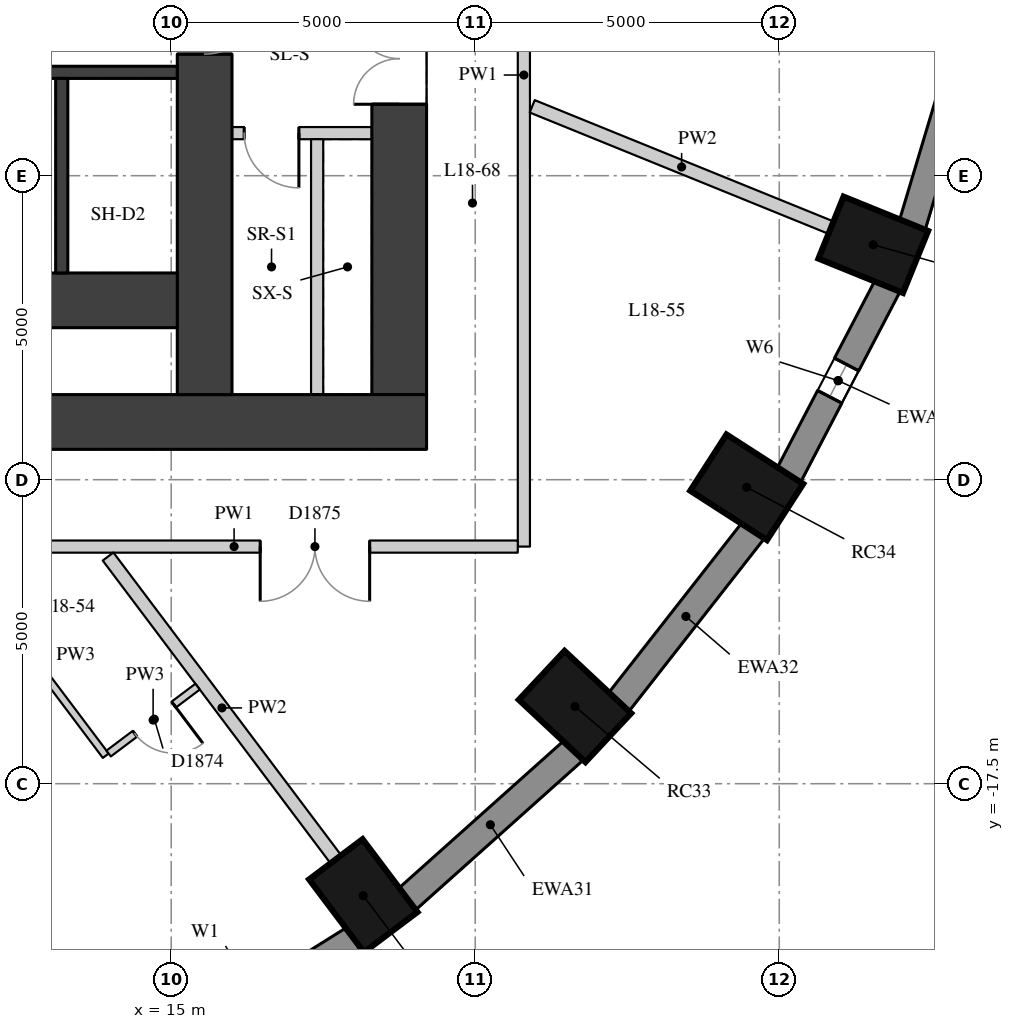
"""IFC4 building model, lengths in metres.
Left out: names, types, materials, properties, quantities, classifications, styles, units other than length and angle.
Written with IfcOpenShell. Run it as: python <this file> out.ifc"""

import sys

from ifc_helpers import new_model, si_unit, direction, frame, frame_2d, origin, origin_2d, place, context, subcontext, project, spatial, rectangle, extrude, element, fill, save


model = new_model("IFC4")
c1 = context("Model", 3, precision=1e-05, world=origin(), true_north=direction((0.0, 1.0)))
c2 = subcontext(c1, "Body", "Model", "MODEL_VIEW")
j1 = project(units=[si_unit("LENGTHUNIT", "METRE"), si_unit("PLANEANGLEUNIT", "RADIAN")], contexts=[c1])
p1 = place(None, origin())
s1 = spatial("IfcSite", under=j1, at=p1, CompositionType="ELEMENT")
p2 = place(p1, origin())
s2 = spatial("IfcBuilding", under=s1, at=p2, CompositionType="ELEMENT")
p3 = place(p2, frame((0.0, 0.0, 67.9)))
s3 = spatial("IfcBuildingStorey", under=s2, at=p3, CompositionType="ELEMENT", Elevation=67.9)
for number, where, z_axis, x_axis in (
    (1, (18.159, -19.343, 0.0), (0.0, 0.0, 1.0), (0.601, -0.799, 0.0)),
    (2, (21.641, -16.23, 0.0), (0.0, 0.0, 1.0), (0.73, -0.683, 0.0)),
    (3, (24.465, -12.625, 0.0), (0.0, 0.0, 1.0), (0.841, -0.541, 0.0)),
    (4, (26.546, -8.636, 0.0), (0.0, 0.0, 1.0), (0.927, -0.376, 0.0)),
):
    element("IfcColumn", number, at=place(p3, frame(where, z_axis=z_axis, x_axis=x_axis)), inside=s3, PredefinedType="COLUMN", context=c2, shape_type="SweptSolid", body=[
        extrude(rectangle(XDim=1.5, YDim=1.1, at=origin_2d()), origin(), (0.0, 0.0, 1.0), 3.3),
    ])
p4 = place(p3, frame((14.817, -22.051, 0.0), z_axis=(0.0, 0.0, 1.0), x_axis=(0.847635480093, 0.530579016629, 0.0)))
e5 = element("IfcWall", 5, at=p4, inside=s3, PredefinedType="SOLIDWALL", context=c2, shape_type="SweptSolid", body=[
    extrude(rectangle(XDim=3.782, YDim=0.45, at=frame_2d((1.891, 0.0))), origin(), (0.0, 0.0, 1.0), 3.02),
])
p5 = place(p4, frame((0.791, 0.0, 0.4)))
e6 = element("IfcOpeningElement", 6, at=p5, cuts=e5, PredefinedType="OPENING", context=c2, shape_type="SweptSolid", body=[
    extrude(rectangle(XDim=2.2, YDim=1.75, at=frame_2d((1.1, 0.875))), frame((0.0, 0.235, 0.0), z_axis=(0.0, -1.0, 0.0), x_axis=(1.0, 0.0, 0.0)), (0.0, 0.0, 1.0), 0.47),
])
p6 = place(p3, frame((18.871, -19.407, 0.0), z_axis=(0.0, 0.0, 1.0), x_axis=(0.745526233716, 0.66647628228, 0.0)))
e7 = element("IfcWall", 7, at=p6, inside=s3, PredefinedType="SOLIDWALL", context=c2, shape_type="SweptSolid", body=[
    extrude(rectangle(XDim=3.697, YDim=0.45, at=frame_2d((1.848, 0.0))), origin(), (0.0, 0.0, 1.0), 3.02),
])
p7 = place(p3, frame((22.352, -16.17, 0.0), z_axis=(0.0, 0.0, 1.0), x_axis=(0.616661975264, 0.787228053529, 0.0)))
e8 = element("IfcWall", 8, at=p7, inside=s3, PredefinedType="SOLIDWALL", context=c2, shape_type="SweptSolid", body=[
    extrude(rectangle(XDim=3.61, YDim=0.45, at=frame_2d((1.805, 0.0))), origin(), (0.0, 0.0, 1.0), 3.02),
])
p8 = place(p3, frame((25.152, -12.437, 0.0), z_axis=(0.0, 0.0, 1.0), x_axis=(0.462492775226, 0.886623050041, 0.0)))
e9 = element("IfcWall", 9, at=p8, inside=s3, PredefinedType="SOLIDWALL", context=c2, shape_type="SweptSolid", body=[
    extrude(rectangle(XDim=3.532, YDim=0.45, at=frame_2d((1.766, 0.0))), origin(), (0.0, 0.0, 1.0), 3.02),
])
p9 = place(p8, frame((1.466, 0.0, 0.4)))
e10 = element("IfcOpeningElement", 10, at=p9, cuts=e9, PredefinedType="OPENING", context=c2, shape_type="SweptSolid", body=[
    extrude(rectangle(XDim=0.6, YDim=1.75, at=frame_2d((0.3, 0.875))), frame((0.0, 0.235, 0.0), z_axis=(0.0, -1.0, 0.0), x_axis=(1.0, 0.0, 0.0)), (0.0, 0.0, 1.0), 0.47),
])
p10 = place(p3, frame((27.185, -8.323, 0.0), z_axis=(0.0, 0.0, 1.0), x_axis=(0.287064133733, 0.957911364963, 0.0)))
e11 = element("IfcWall", 11, at=p10, inside=s3, PredefinedType="SOLIDWALL", context=c2, shape_type="SweptSolid", body=[
    extrude(rectangle(XDim=3.473, YDim=0.45, at=frame_2d((1.737, 0.0))), origin(), (0.0, 0.0, 1.0), 3.02),
])
p11 = place(p3, frame((18.75, -11.1, 0.0), z_axis=(0.0, 0.0, 1.0), x_axis=(0.0, 1.0, 0.0)))
e12 = element("IfcWall", 12, at=p11, inside=s3, PredefinedType="SHEAR", context=c2, shape_type="SweptSolid", body=[
    extrude(rectangle(XDim=22.2, YDim=0.9, at=frame_2d((11.1, 0.0))), origin(), (0.0, 0.0, 1.0), 3.02),
])
p12 = place(p11, frame((15.675, 0.0, 0.0)))
e13 = element("IfcOpeningElement", 13, at=p12, cuts=e12, PredefinedType="OPENING", context=c2, shape_type="SweptSolid", body=[
    extrude(rectangle(XDim=1.5, YDim=2.1, at=frame_2d((0.75, 1.05))), frame((0.0, 0.46, 0.0), z_axis=(0.0, -1.0, 0.0), x_axis=(1.0, 0.0, 0.0)), (0.0, 0.0, 1.0), 0.92),
])
p13 = place(p11, frame((4.775, 0.0, 0.0)))
e14 = element("IfcOpeningElement", 14, at=p13, cuts=e12, PredefinedType="OPENING", context=c2, shape_type="SweptSolid", body=[
    extrude(rectangle(XDim=1.5, YDim=2.1, at=frame_2d((0.75, 1.05))), frame((0.0, 0.46, 0.0), z_axis=(0.0, -1.0, 0.0), x_axis=(1.0, 0.0, 0.0)), (0.0, 0.0, 1.0), 0.92),
])
p14 = place(p3, frame((4.0, -11.55, 0.0), z_axis=(0.0, 0.0, 1.0), x_axis=(1.0, 0.0, 0.0)))
e15 = element("IfcWall", 15, at=p14, inside=s3, PredefinedType="SHEAR", context=c2, shape_type="SweptSolid", body=[
    extrude(rectangle(XDim=15.2, YDim=0.9, at=frame_2d((7.6, 0.0))), origin(), (0.0, 0.0, 1.0), 3.02),
])
p15 = place(p3, frame((15.55, -11.1, 0.0), z_axis=(0.0, 0.0, 1.0), x_axis=(0.0, 1.0, 0.0)))
e16 = element("IfcWall", 16, at=p15, inside=s3, PredefinedType="SHEAR", context=c2, shape_type="SweptSolid", body=[
    extrude(rectangle(XDim=22.2, YDim=0.9, at=frame_2d((11.1, 0.0))), origin(), (0.0, 0.0, 1.0), 3.02),
])
p16 = place(p15, frame((15.6, 0.0, 0.0)))
e17 = element("IfcOpeningElement", 17, at=p16, cuts=e16, PredefinedType="OPENING", context=c2, shape_type="SweptSolid", body=[
    extrude(rectangle(XDim=1.0, YDim=2.1, at=frame_2d((0.5, 1.05))), frame((0.0, 0.46, 0.0), z_axis=(0.0, -1.0, 0.0), x_axis=(1.0, 0.0, 0.0)), (0.0, 0.0, 1.0), 0.92),
])
p17 = place(p15, frame((5.6, 0.0, 0.0)))
e18 = element("IfcOpeningElement", 18, at=p17, cuts=e16, PredefinedType="OPENING", context=c2, shape_type="SweptSolid", body=[
    extrude(rectangle(XDim=1.0, YDim=2.1, at=frame_2d((0.5, 1.05))), frame((0.0, 0.46, 0.0), z_axis=(0.0, -1.0, 0.0), x_axis=(1.0, 0.0, 0.0)), (0.0, 0.0, 1.0), 0.92),
])
p18 = place(p3, frame((4.9, -9.55, 0.0), z_axis=(0.0, 0.0, 1.0), x_axis=(1.0, 0.0, 0.0)))
e19 = element("IfcWall", 19, at=p18, inside=s3, PredefinedType="SHEAR", context=c2, shape_type="SweptSolid", body=[
    extrude(rectangle(XDim=10.2, YDim=0.9, at=frame_2d((5.1, 0.0))), origin(), (0.0, 0.0, 1.0), 3.02),
])
p19 = place(p3, frame((4.9, -5.8, 0.0), z_axis=(0.0, 0.0, 1.0), x_axis=(1.0, 0.0, 0.0)))
e20 = element("IfcWall", 20, at=p19, inside=s3, PredefinedType="SHEAR", context=c2, shape_type="SweptSolid", body=[
    extrude(rectangle(XDim=10.2, YDim=0.2, at=frame_2d((5.1, 0.0))), origin(), (0.0, 0.0, 1.0), 3.02),
])
p20 = place(p3, frame((13.2, -9.1, 0.0), z_axis=(0.0, 0.0, 1.0), x_axis=(0.0, 1.0, 0.0)))
e21 = element("IfcWall", 21, at=p20, inside=s3, PredefinedType="SHEAR", context=c2, shape_type="SweptSolid", body=[
    extrude(rectangle(XDim=3.2, YDim=0.2, at=frame_2d((1.6, 0.0))), origin(), (0.0, 0.0, 1.0), 3.02),
])
p21 = place(p3, frame((16.0, -6.8, 0.0), z_axis=(0.0, 0.0, 1.0), x_axis=(1.0, 0.0, 0.0)))
e22 = element("IfcWall", 22, at=p21, inside=s3, PredefinedType="PARTITIONING", context=c2, shape_type="SweptSolid", body=[
    extrude(rectangle(XDim=2.3, YDim=0.2, at=frame_2d((1.15, 0.0))), origin(), (0.0, 0.0, 1.0), 3.02),
])
p22 = place(p21, frame((0.2, 0.0, 0.0)))
e23 = element("IfcOpeningElement", 23, at=p22, cuts=e22, PredefinedType="OPENING", context=c2, shape_type="SweptSolid", body=[
    extrude(rectangle(XDim=0.9, YDim=2.1, at=frame_2d((0.45, 1.05))), frame((0.0, 0.11, 0.0), z_axis=(0.0, -1.0, 0.0), x_axis=(1.0, 0.0, 0.0)), (0.0, 0.0, 1.0), 0.22),
])
p23 = place(p3, frame((17.4, -11.1, 0.0), z_axis=(0.0, 0.0, 1.0), x_axis=(0.0, 1.0, 0.0)))
e24 = element("IfcWall", 24, at=p23, inside=s3, PredefinedType="PARTITIONING", context=c2, shape_type="SweptSolid", body=[
    extrude(rectangle(XDim=4.2, YDim=0.2, at=frame_2d((2.1, 0.0))), origin(), (0.0, 0.0, 1.0), 3.02),
])
p24 = place(p3, frame((20.8, 1.912, 0.0), z_axis=(0.0, 0.0, 1.0), x_axis=(0.0, -1.0, 0.0)))
e25 = element("IfcWall", 25, at=p24, inside=s3, PredefinedType="PARTITIONING", context=c2, shape_type="SweptSolid", body=[
    extrude(rectangle(XDim=15.512, YDim=0.2, at=frame_2d((7.756, 0.0))), origin(), (0.0, 0.0, 1.0), 3.02),
])
p25 = place(p24, frame((3.11, 0.0, 0.0)))
e26 = element("IfcOpeningElement", 26, at=p25, cuts=e25, PredefinedType="OPENING", context=c2, shape_type="SweptSolid", body=[
    extrude(rectangle(XDim=1.8, YDim=2.1, at=frame_2d((0.9, 1.05))), frame((0.0, 0.11, 0.0), z_axis=(0.0, -1.0, 0.0), x_axis=(1.0, 0.0, 0.0)), (0.0, 0.0, 1.0), 0.22),
])
p26 = place(p3, frame((20.7, -13.6, 0.0), z_axis=(0.0, 0.0, 1.0), x_axis=(-1.0, 0.0, 0.0)))
e27 = element("IfcWall", 27, at=p26, inside=s3, PredefinedType="PARTITIONING", context=c2, shape_type="SweptSolid", body=[
    extrude(rectangle(XDim=9.331, YDim=0.2, at=frame_2d((4.666, 0.0))), origin(), (0.0, 0.0, 1.0), 3.02),
])
p27 = place(p26, frame((2.436, 0.0, 0.0)))
e28 = element("IfcOpeningElement", 28, at=p27, cuts=e27, PredefinedType="OPENING", context=c2, shape_type="SweptSolid", body=[
    extrude(rectangle(XDim=1.8, YDim=2.1, at=frame_2d((0.9, 1.05))), frame((0.0, 0.11, 0.0), z_axis=(0.0, -1.0, 0.0), x_axis=(1.0, 0.0, 0.0)), (0.0, 0.0, 1.0), 0.22),
])
p28 = place(p3, frame((17.708, -18.743, 0.0), z_axis=(0.0, 0.0, 1.0), x_axis=(-0.601177883261, 0.799115231164, 0.0)))
e29 = element("IfcWall", 29, at=p28, inside=s3, PredefinedType="PARTITIONING", context=c2, shape_type="SweptSolid", body=[
    extrude(rectangle(XDim=6.231, YDim=0.22, at=frame_2d((3.116, 0.0))), origin(), (0.0, 0.0, 1.0), 3.02),
])
p29 = place(p3, frame((25.851, -8.354, 0.0), z_axis=(0.0, 0.0, 1.0), x_axis=(-0.926546814299, 0.376179479653, 0.0)))
e30 = element("IfcWall", 30, at=p29, inside=s3, PredefinedType="PARTITIONING", context=c2, shape_type="SweptSolid", body=[
    extrude(rectangle(XDim=5.304, YDim=0.22, at=frame_2d((2.652, 0.0))), origin(), (0.0, 0.0, 1.0), 3.02),
])
p30 = place(p3, frame((11.435, -13.732, 0.0), z_axis=(0.0, 0.0, 1.0), x_axis=(0.601141274104, -0.799142771079, 0.0)))
e31 = element("IfcWall", 31, at=p30, inside=s3, PredefinedType="PARTITIONING", context=c2, shape_type="SweptSolid", body=[
    extrude(rectangle(XDim=4.139, YDim=0.12, at=frame_2d((2.07, 0.0))), origin(), (0.0, 0.0, 1.0), 3.02),
])
p31 = place(p3, frame((13.971, -17.004, 0.0), z_axis=(0.0, 0.0, 1.0), x_axis=(0.799231057954, 0.60102388971, 0.0)))
e32 = element("IfcWall", 32, at=p31, inside=s3, PredefinedType="PARTITIONING", context=c2, shape_type="SweptSolid", body=[
    extrude(rectangle(XDim=1.83, YDim=0.12, at=frame_2d((0.915, 0.0))), origin(), (0.0, 0.0, 1.0), 3.02),
])
p32 = place(p31, frame((0.54, 0.0, 0.0)))
e33 = element("IfcOpeningElement", 33, at=p32, cuts=e32, PredefinedType="OPENING", context=c2, shape_type="SweptSolid", body=[
    extrude(rectangle(XDim=0.8, YDim=2.1, at=frame_2d((0.4, 1.05))), frame((0.0, 0.07, 0.0), z_axis=(0.0, -1.0, 0.0), x_axis=(1.0, 0.0, 0.0)), (0.0, 0.0, 1.0), 0.14),
])
p33 = place(p9, origin())
e34 = element("IfcWindow", 34, at=p33, inside=s3, PartitioningType="SINGLE_PANEL", PredefinedType="WINDOW", context=c2, shape_type="SweptSolid", body=[
    extrude(rectangle(XDim=0.6, YDim=1.75, at=frame_2d((0.3, 0.875))), frame((0.0, 0.035, 0.0), z_axis=(0.0, -1.0, 0.0), x_axis=(1.0, 0.0, 0.0)), (0.0, 0.0, 1.0), 0.06),
])
fill(e10, e34)
p34 = place(p13, origin())
e35 = element("IfcDoor", 35, at=p34, inside=s3, OperationType="DOUBLE_DOOR_SINGLE_SWING", PredefinedType="DOOR", context=c2, shape_type="SweptSolid", body=[
    extrude(rectangle(XDim=1.5, YDim=2.1, at=frame_2d((0.75, 1.05))), frame((0.0, 0.025, 0.0), z_axis=(0.0, -1.0, 0.0), x_axis=(1.0, 0.0, 0.0)), (0.0, 0.0, 1.0), 0.05),
])
fill(e14, e35)
p35 = place(p17, origin())
e36 = element("IfcDoor", 36, at=p35, inside=s3, OperationType="SINGLE_SWING_LEFT", PredefinedType="DOOR", context=c2, shape_type="SweptSolid", body=[
    extrude(rectangle(XDim=1.0, YDim=2.1, at=frame_2d((0.5, 1.05))), frame((0.0, 0.025, 0.0), z_axis=(0.0, -1.0, 0.0), x_axis=(1.0, 0.0, 0.0)), (0.0, 0.0, 1.0), 0.05),
])
fill(e18, e36)
p36 = place(p22, origin())
e37 = element("IfcDoor", 37, at=p36, inside=s3, OperationType="SINGLE_SWING_LEFT", PredefinedType="DOOR", context=c2, shape_type="SweptSolid", body=[
    extrude(rectangle(XDim=0.9, YDim=2.1, at=frame_2d((0.45, 1.05))), frame((0.0, 0.025, 0.0), z_axis=(0.0, -1.0, 0.0), x_axis=(1.0, 0.0, 0.0)), (0.0, 0.0, 1.0), 0.05),
])
fill(e23, e37)
p37 = place(p32, origin())
e38 = element("IfcDoor", 38, at=p37, inside=s3, OperationType="SINGLE_SWING_LEFT", PredefinedType="DOOR", context=c2, shape_type="SweptSolid", body=[
    extrude(rectangle(XDim=0.8, YDim=2.1, at=frame_2d((0.4, 1.05))), frame((0.0, 0.025, 0.0), z_axis=(0.0, -1.0, 0.0), x_axis=(1.0, 0.0, 0.0)), (0.0, 0.0, 1.0), 0.05),
])
fill(e33, e38)
p38 = place(p27, origin())
e39 = element("IfcDoor", 39, at=p38, inside=s3, OperationType="DOUBLE_DOOR_SINGLE_SWING", PredefinedType="DOOR", context=c2, shape_type="SweptSolid", body=[
    extrude(rectangle(XDim=1.8, YDim=2.1, at=frame_2d((0.9, 1.05))), frame((0.0, 0.025, 0.0), z_axis=(0.0, -1.0, 0.0), x_axis=(1.0, 0.0, 0.0)), (0.0, 0.0, 1.0), 0.05),
])
fill(e28, e39)
save(model, sys.argv[1])
